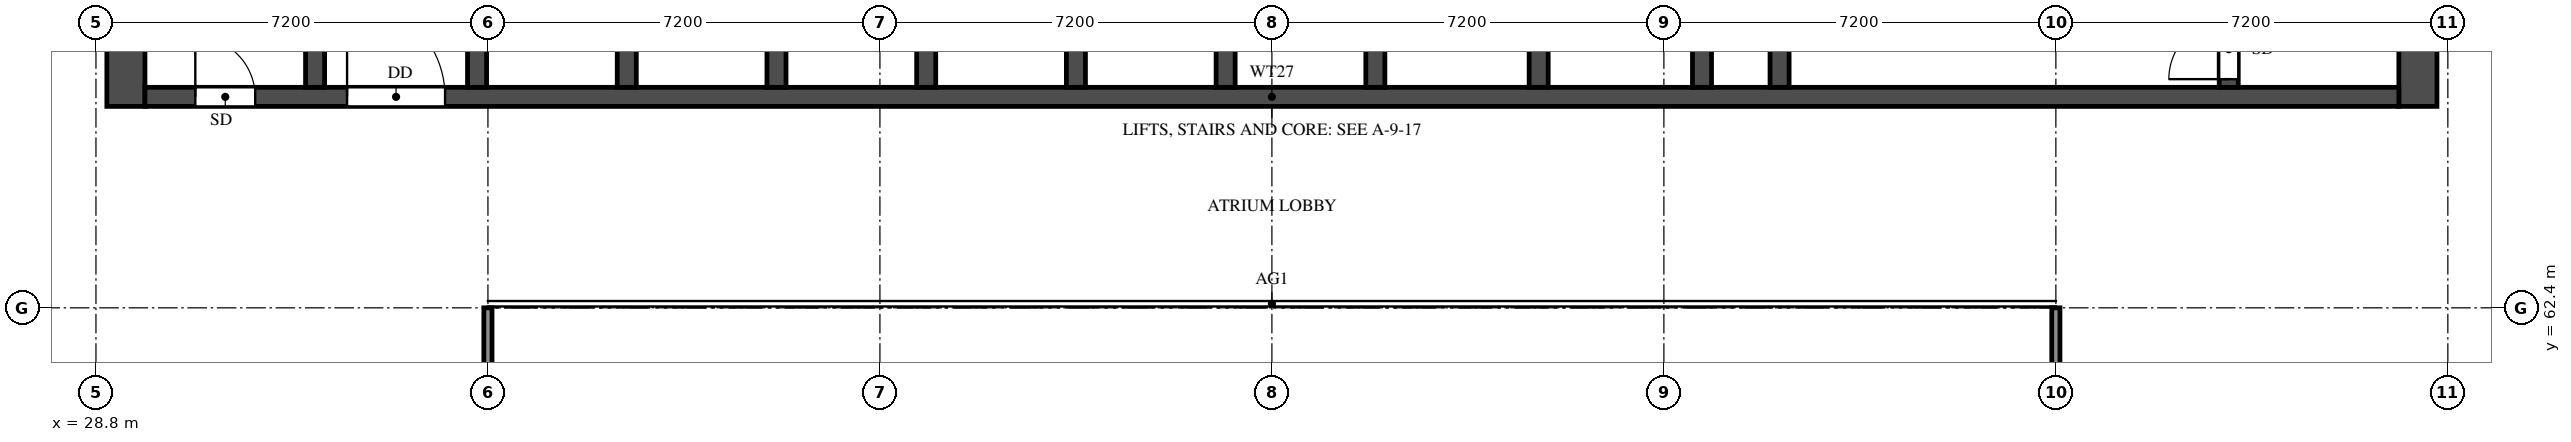
"""IFC4 building model, lengths in metres.
Left out: names, types, materials, properties, quantities, classifications, styles, units other than length and angle.
Written with IfcOpenShell. Run it as: python <this file> out.ifc"""

import sys

from ifc_helpers import new_model, si_unit, direction, frame, frame_2d, origin, place, context, subcontext, project, spatial, rectangle, extrude, element, fill, save


model = new_model("IFC4")
c1 = context("Model", 3, precision=1e-05, world=origin(), true_north=direction((0.0, 1.0)))
c2 = subcontext(c1, "Body", "Model", "MODEL_VIEW")
j1 = project(units=[si_unit("LENGTHUNIT", "METRE"), si_unit("PLANEANGLEUNIT", "RADIAN")], contexts=[c1])
p1 = place(None, origin())
s1 = spatial("IfcSite", under=j1, at=p1, CompositionType="ELEMENT")
p2 = place(p1, origin())
s2 = spatial("IfcBuilding", under=s1, at=p2, CompositionType="ELEMENT")
p3 = place(p2, frame((0.0, 0.0, 116.5)))
s3 = spatial("IfcBuildingStorey", under=s2, at=p3, CompositionType="ELEMENT", Elevation=116.5)
for number, where, z_axis, x_axis in (
    (1, (29.35, 66.1, 0.0), (0.0, 0.0, 1.0), (0.0, 1.0, 0.0)),
    (2, (71.45, 66.1, 0.0), (0.0, 0.0, 1.0), (0.0, 1.0, 0.0)),
):
    element("IfcWall", number, at=place(p3, frame(where, z_axis=z_axis, x_axis=x_axis)), inside=s3, PredefinedType="SHEAR", context=c2, shape_type="SweptSolid", body=[
        extrude(rectangle(XDim=11.9, YDim=0.7, at=frame_2d((5.95, 0.0))), origin(), (0.0, 0.0, 1.0), 3.2),
    ])
p4 = place(p3, frame((29.7, 66.275, 0.0), z_axis=(0.0, 0.0, 1.0), x_axis=(1.0, 0.0, 0.0)))
e3 = element("IfcWall", 3, at=p4, inside=s3, PredefinedType="SHEAR", context=c2, shape_type="SweptSolid", body=[
    extrude(rectangle(XDim=41.4, YDim=0.35, at=frame_2d((20.7, 0.0))), origin(), (0.0, 0.0, 1.0), 3.2),
])
p5 = place(p4, frame((0.925, 0.0, 0.0)))
e4 = element("IfcOpeningElement", 4, at=p5, cuts=e3, PredefinedType="OPENING", context=c2, shape_type="SweptSolid", body=[
    extrude(rectangle(XDim=1.1, YDim=2.1, at=frame_2d((0.55, 1.05))), frame((0.0, 0.185, 0.0), z_axis=(0.0, -1.0, 0.0), x_axis=(1.0, 0.0, 0.0)), (0.0, 0.0, 1.0), 0.37),
])
p6 = place(p4, frame((3.712, 0.0, 0.0)))
e5 = element("IfcOpeningElement", 5, at=p6, cuts=e3, PredefinedType="OPENING", context=c2, shape_type="SweptSolid", body=[
    extrude(rectangle(XDim=1.8, YDim=2.1, at=frame_2d((0.9, 1.05))), frame((0.0, 0.185, 0.0), z_axis=(0.0, -1.0, 0.0), x_axis=(1.0, 0.0, 0.0)), (0.0, 0.0, 1.0), 0.37),
])
p7 = place(p3, frame((32.825, 66.45, 0.0), z_axis=(0.0, 0.0, 1.0), x_axis=(0.0, 1.0, 0.0)))
e6 = element("IfcWall", 6, at=p7, inside=s3, PredefinedType="SHEAR", context=c2, shape_type="SweptSolid", body=[
    extrude(rectangle(XDim=10.85, YDim=0.35, at=frame_2d((5.425, 0.0))), origin(), (0.0, 0.0, 1.0), 3.2),
])
p8 = place(p3, frame((67.975, 66.45, 0.0), z_axis=(0.0, 0.0, 1.0), x_axis=(0.0, 1.0, 0.0)))
e7 = element("IfcWall", 7, at=p8, inside=s3, PredefinedType="SHEAR", context=c2, shape_type="SweptSolid", body=[
    extrude(rectangle(XDim=10.85, YDim=0.35, at=frame_2d((5.425, 0.0))), origin(), (0.0, 0.0, 1.0), 3.2),
])
p9 = place(p8, frame((0.15, 0.0, 0.0)))
e8 = element("IfcOpeningElement", 8, at=p9, cuts=e7, PredefinedType="OPENING", context=c2, shape_type="SweptSolid", body=[
    extrude(rectangle(XDim=1.1, YDim=2.1, at=frame_2d((0.55, 1.05))), frame((0.0, 0.185, 0.0), z_axis=(0.0, -1.0, 0.0), x_axis=(1.0, 0.0, 0.0)), (0.0, 0.0, 1.0), 0.37),
])
p10 = place(p3, frame((59.725, 66.45, 0.0), z_axis=(0.0, 0.0, 1.0), x_axis=(0.0, 1.0, 0.0)))
e9 = element("IfcWall", 9, at=p10, inside=s3, PredefinedType="SHEAR", context=c2, shape_type="SweptSolid", body=[
    extrude(rectangle(XDim=6.125, YDim=0.35, at=frame_2d((3.062, 0.0))), origin(), (0.0, 0.0, 1.0), 3.2),
])
p11 = place(p10, frame((3.85, 0.0, 0.0)))
e10 = element("IfcOpeningElement", 10, at=p11, cuts=e9, PredefinedType="OPENING", context=c2, shape_type="SweptSolid", body=[
    extrude(rectangle(XDim=1.2, YDim=2.1, at=frame_2d((0.6, 1.05))), frame((0.0, 0.185, 0.0), z_axis=(0.0, -1.0, 0.0), x_axis=(1.0, 0.0, 0.0)), (0.0, 0.0, 1.0), 0.37),
])
for number, where, z_axis, x_axis in (
    (11, (35.8, 66.45, 0.0), (0.0, 0.0, 1.0), (0.0, 1.0, 0.0)),
    (12, (38.55, 66.45, 0.0), (0.0, 0.0, 1.0), (0.0, 1.0, 0.0)),
    (13, (41.3, 66.45, 0.0), (0.0, 0.0, 1.0), (0.0, 1.0, 0.0)),
    (14, (44.05, 66.45, 0.0), (0.0, 0.0, 1.0), (0.0, 1.0, 0.0)),
    (15, (46.8, 66.45, 0.0), (0.0, 0.0, 1.0), (0.0, 1.0, 0.0)),
    (16, (49.55, 66.45, 0.0), (0.0, 0.0, 1.0), (0.0, 1.0, 0.0)),
    (17, (52.3, 66.45, 0.0), (0.0, 0.0, 1.0), (0.0, 1.0, 0.0)),
    (18, (55.3, 66.45, 0.0), (0.0, 0.0, 1.0), (0.0, 1.0, 0.0)),
    (19, (58.3, 66.45, 0.0), (0.0, 0.0, 1.0), (0.0, 1.0, 0.0)),
):
    element("IfcWall", number, at=place(p3, frame(where, z_axis=z_axis, x_axis=x_axis)), inside=s3, PredefinedType="SHEAR", context=c2, shape_type="SweptSolid", body=[
        extrude(rectangle(XDim=2.425, YDim=0.35, at=frame_2d((1.212, 0.0))), origin(), (0.0, 0.0, 1.0), 3.2),
    ])
for number, where, z_axis, x_axis in (
    (20, (36.0, 48.0, 0.0), (0.0, 0.0, 1.0), (0.0, 1.0, 0.0)),
    (21, (64.8, 48.0, 0.0), (0.0, 0.0, 1.0), (0.0, 1.0, 0.0)),
):
    element("IfcWall", number, at=place(p3, frame(where, z_axis=z_axis, x_axis=x_axis)), inside=s3, PredefinedType="SOLIDWALL", context=c2, shape_type="SweptSolid", body=[
        extrude(rectangle(XDim=14.4, YDim=0.15, at=frame_2d((7.2, 0.0))), origin(), (0.0, 0.0, 1.0), 2.3),
    ])
p12 = place(p5, origin())
e22 = element("IfcDoor", 22, at=p12, inside=s3, OperationType="SINGLE_SWING_LEFT", PredefinedType="DOOR", context=c2, shape_type="SweptSolid", body=[
    extrude(rectangle(XDim=1.1, YDim=2.1, at=frame_2d((0.55, 1.05))), frame((0.0, 0.025, 0.0), z_axis=(0.0, -1.0, 0.0), x_axis=(1.0, 0.0, 0.0)), (0.0, 0.0, 1.0), 0.05),
])
fill(e4, e22)
p13 = place(p9, origin())
e23 = element("IfcDoor", 23, at=p13, inside=s3, OperationType="SINGLE_SWING_LEFT", PredefinedType="DOOR", context=c2, shape_type="SweptSolid", body=[
    extrude(rectangle(XDim=1.1, YDim=2.1, at=frame_2d((0.55, 1.05))), frame((0.0, 0.025, 0.0), z_axis=(0.0, -1.0, 0.0), x_axis=(1.0, 0.0, 0.0)), (0.0, 0.0, 1.0), 0.05),
])
fill(e8, e23)
p14 = place(p6, origin())
e24 = element("IfcDoor", 24, at=p14, inside=s3, OperationType="DOUBLE_DOOR_SINGLE_SWING", PredefinedType="DOOR", context=c2, shape_type="SweptSolid", body=[
    extrude(rectangle(XDim=1.8, YDim=2.1, at=frame_2d((0.9, 1.05))), frame((0.0, 0.025, 0.0), z_axis=(0.0, -1.0, 0.0), x_axis=(1.0, 0.0, 0.0)), (0.0, 0.0, 1.0), 0.05),
])
fill(e5, e24)
save(model, sys.argv[1])
